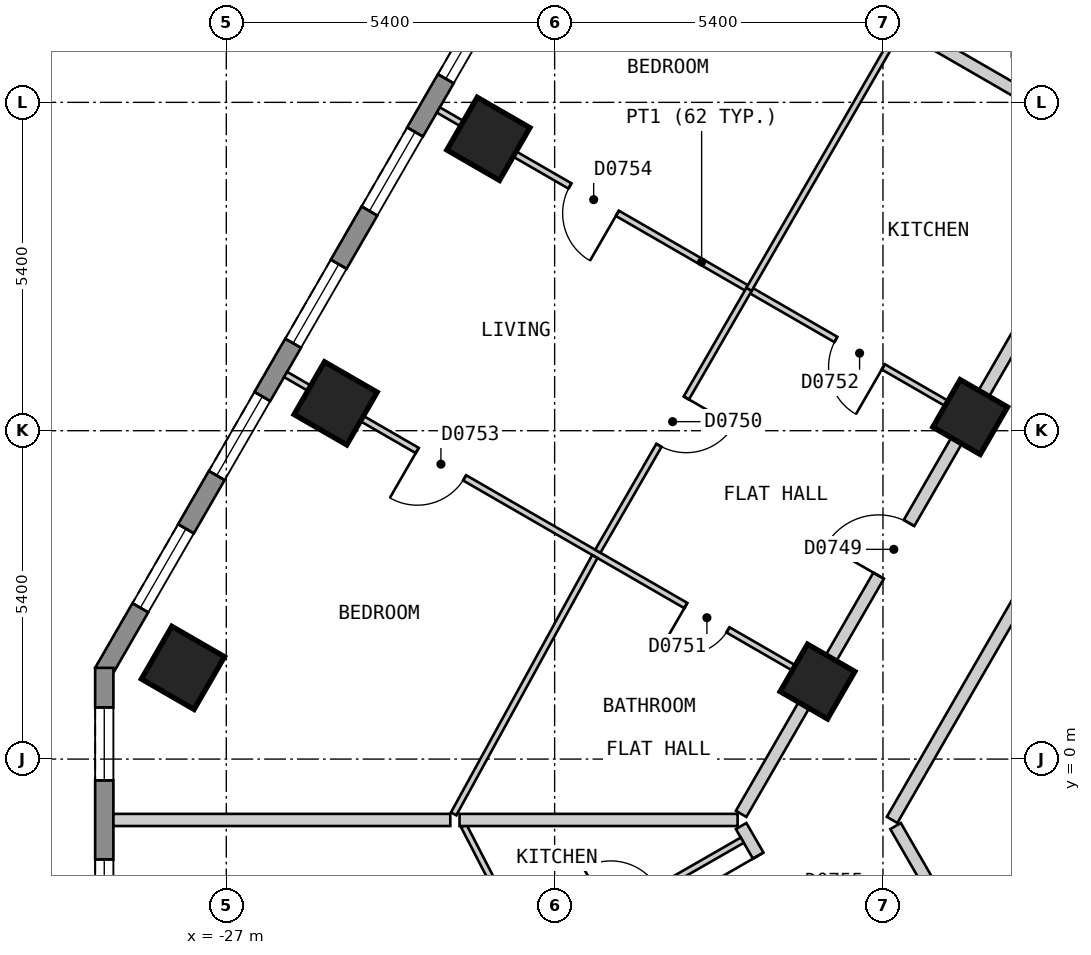
"""IFC4 building model, lengths in metres.
Left out: names, types, materials, properties, quantities, classifications, styles, units other than length and angle.
Written with IfcOpenShell. Run it as: python <this file> out.ifc"""

import sys

from ifc_helpers import new_model, si_unit, direction, frame, frame_2d, origin, origin_2d, place, context, subcontext, project, spatial, polyline, rectangle, outline, extrude, element, fill, save


model = new_model("IFC4")
c1 = context("Model", 3, precision=1e-05, world=origin(), true_north=direction((0.0, 1.0)))
c2 = subcontext(c1, "Body", "Model", "MODEL_VIEW")
j1 = project(units=[si_unit("LENGTHUNIT", "METRE"), si_unit("PLANEANGLEUNIT", "RADIAN")], contexts=[c1])
p1 = place(None, origin())
s1 = spatial("IfcSite", under=j1, at=p1, CompositionType="ELEMENT")
p2 = place(p1, origin())
s2 = spatial("IfcBuilding", under=s1, at=p2, CompositionType="ELEMENT")
p3 = place(p2, frame((0.0, 0.0, 93.0)))
s3 = spatial("IfcBuildingStorey", under=s2, at=p3, CompositionType="ELEMENT", Elevation=93.0)
for number, where, z_axis, x_axis in (
    (1, (-22.69, 10.2, 0.0), (0.0, 0.0, 1.0), (-0.5, -0.866, 0.0)),
    (2, (-25.202, 5.85, 0.0), (0.0, 0.0, 1.0), (-0.5, -0.866, 0.0)),
    (3, (-27.713, 1.5, 0.0), (0.0, 0.0, 1.0), (-0.5, -0.866, 0.0)),
):
    element("IfcColumn", number, at=place(p3, frame(where, z_axis=z_axis, x_axis=x_axis)), inside=s3, PredefinedType="COLUMN", context=c2, shape_type="SweptSolid", body=[
        extrude(rectangle(XDim=1.0, YDim=1.0, at=origin_2d()), origin(), (0.0, 0.0, 1.0), 3.0),
    ])
for number, where, z_axis, x_axis in (
    (4, (-14.766, 5.625, 0.0), (0.0, 0.0, 1.0), (-0.5, -0.866, 0.0)),
    (5, (-17.277, 1.275, 0.0), (0.0, 0.0, 1.0), (-0.5, -0.866, 0.0)),
):
    element("IfcColumn", number, at=place(p3, frame(where, z_axis=z_axis, x_axis=x_axis)), inside=s3, PredefinedType="COLUMN", context=c2, shape_type="SweptSolid", body=[
        extrude(rectangle(XDim=0.9, YDim=0.9, at=origin_2d()), origin(), (0.0, 0.0, 1.0), 3.0),
    ])
p4 = place(p3, frame((-15.747, 24.425, 0.0), z_axis=(0.0, 0.0, 1.0), x_axis=(-0.500027479704, -0.866009537788, 0.0)))
e6 = element("IfcWall", 6, at=p4, inside=s3, PredefinedType="SOLIDWALL", context=c2, shape_type="SweptSolid", body=[
    extrude(outline(polyline([(0.0, -0.15), (26.559, -0.15), (26.478, 0.15), (0.08, 0.15), (0.0, -0.15)])), origin(), (0.0, 0.0, 1.0), 2.7),
])
p5 = place(p4, frame((1.227, 0.0, 0.15)))
e7 = element("IfcOpeningElement", 7, at=p5, cuts=e6, PredefinedType="OPENING", context=c2, shape_type="SweptSolid", body=[
    extrude(rectangle(XDim=1.5, YDim=2.1, at=frame_2d((0.75, 1.05))), frame((0.0, 0.16, 0.0), z_axis=(0.0, -1.0, 0.0), x_axis=(1.0, 0.0, 0.0)), (0.0, 0.0, 1.0), 0.32),
])
p6 = place(p4, frame((3.739, 0.0, 0.15)))
e8 = element("IfcOpeningElement", 8, at=p6, cuts=e6, PredefinedType="OPENING", context=c2, shape_type="SweptSolid", body=[
    extrude(rectangle(XDim=1.5, YDim=2.1, at=frame_2d((0.75, 1.05))), frame((0.0, 0.16, 0.0), z_axis=(0.0, -1.0, 0.0), x_axis=(1.0, 0.0, 0.0)), (0.0, 0.0, 1.0), 0.32),
])
p7 = place(p4, frame((6.25, 0.0, 0.15)))
e9 = element("IfcOpeningElement", 9, at=p7, cuts=e6, PredefinedType="OPENING", context=c2, shape_type="SweptSolid", body=[
    extrude(rectangle(XDim=1.5, YDim=2.1, at=frame_2d((0.75, 1.05))), frame((0.0, 0.16, 0.0), z_axis=(0.0, -1.0, 0.0), x_axis=(1.0, 0.0, 0.0)), (0.0, 0.0, 1.0), 0.32),
])
p8 = place(p4, frame((8.761, 0.0, 0.15)))
e10 = element("IfcOpeningElement", 10, at=p8, cuts=e6, PredefinedType="OPENING", context=c2, shape_type="SweptSolid", body=[
    extrude(rectangle(XDim=1.5, YDim=2.1, at=frame_2d((0.75, 1.05))), frame((0.0, 0.16, 0.0), z_axis=(0.0, -1.0, 0.0), x_axis=(1.0, 0.0, 0.0)), (0.0, 0.0, 1.0), 0.32),
])
p9 = place(p4, frame((11.273, 0.0, 0.15)))
e11 = element("IfcOpeningElement", 11, at=p9, cuts=e6, PredefinedType="OPENING", context=c2, shape_type="SweptSolid", body=[
    extrude(rectangle(XDim=1.5, YDim=2.1, at=frame_2d((0.75, 1.05))), frame((0.0, 0.16, 0.0), z_axis=(0.0, -1.0, 0.0), x_axis=(1.0, 0.0, 0.0)), (0.0, 0.0, 1.0), 0.32),
])
p10 = place(p4, frame((13.785, 0.0, 0.15)))
e12 = element("IfcOpeningElement", 12, at=p10, cuts=e6, PredefinedType="OPENING", context=c2, shape_type="SweptSolid", body=[
    extrude(rectangle(XDim=1.5, YDim=2.1, at=frame_2d((0.75, 1.05))), frame((0.0, 0.16, 0.0), z_axis=(0.0, -1.0, 0.0), x_axis=(1.0, 0.0, 0.0)), (0.0, 0.0, 1.0), 0.32),
])
p11 = place(p4, frame((16.296, 0.0, 0.15)))
e13 = element("IfcOpeningElement", 13, at=p11, cuts=e6, PredefinedType="OPENING", context=c2, shape_type="SweptSolid", body=[
    extrude(rectangle(XDim=1.5, YDim=2.1, at=frame_2d((0.75, 1.05))), frame((0.0, 0.16, 0.0), z_axis=(0.0, -1.0, 0.0), x_axis=(1.0, 0.0, 0.0)), (0.0, 0.0, 1.0), 0.32),
])
p12 = place(p4, frame((18.807, 0.0, 0.15)))
e14 = element("IfcOpeningElement", 14, at=p12, cuts=e6, PredefinedType="OPENING", context=c2, shape_type="SweptSolid", body=[
    extrude(rectangle(XDim=1.5, YDim=2.1, at=frame_2d((0.75, 1.05))), frame((0.0, 0.16, 0.0), z_axis=(0.0, -1.0, 0.0), x_axis=(1.0, 0.0, 0.0)), (0.0, 0.0, 1.0), 0.32),
])
p13 = place(p4, frame((21.319, 0.0, 0.15)))
e15 = element("IfcOpeningElement", 15, at=p13, cuts=e6, PredefinedType="OPENING", context=c2, shape_type="SweptSolid", body=[
    extrude(rectangle(XDim=1.5, YDim=2.1, at=frame_2d((0.75, 1.05))), frame((0.0, 0.16, 0.0), z_axis=(0.0, -1.0, 0.0), x_axis=(1.0, 0.0, 0.0)), (0.0, 0.0, 1.0), 0.32),
])
p14 = place(p4, frame((23.831, 0.0, 0.15)))
e16 = element("IfcOpeningElement", 16, at=p14, cuts=e6, PredefinedType="OPENING", context=c2, shape_type="SweptSolid", body=[
    extrude(rectangle(XDim=1.5, YDim=2.1, at=frame_2d((0.75, 1.05))), frame((0.0, 0.16, 0.0), z_axis=(0.0, -1.0, 0.0), x_axis=(1.0, 0.0, 0.0)), (0.0, 0.0, 1.0), 0.32),
])
p15 = place(p3, frame((-29.007, 1.5, 0.0), z_axis=(0.0, 0.0, 1.0), x_axis=(0.0, -1.0, 0.0)))
e17 = element("IfcWall", 17, at=p15, inside=s3, PredefinedType="SOLIDWALL", context=c2, shape_type="SweptSolid", body=[
    extrude(outline(polyline([(0.0, -0.15), (5.0, -0.15), (4.92, 0.15), (0.08, 0.15), (0.0, -0.15)])), origin(), (0.0, 0.0, 1.0), 2.7),
])
p16 = place(p15, frame((0.65, 0.0, 0.15)))
e18 = element("IfcOpeningElement", 18, at=p16, cuts=e17, PredefinedType="OPENING", context=c2, shape_type="SweptSolid", body=[
    extrude(rectangle(XDim=1.2, YDim=2.1, at=frame_2d((0.6, 1.05))), frame((0.0, 0.16, 0.0), z_axis=(0.0, -1.0, 0.0), x_axis=(1.0, 0.0, 0.0)), (0.0, 0.0, 1.0), 0.32),
])
p17 = place(p15, frame((3.15, 0.0, 0.15)))
e19 = element("IfcOpeningElement", 19, at=p17, cuts=e17, PredefinedType="OPENING", context=c2, shape_type="SweptSolid", body=[
    extrude(rectangle(XDim=1.2, YDim=2.1, at=frame_2d((0.6, 1.05))), frame((0.0, 0.16, 0.0), z_axis=(0.0, -1.0, 0.0), x_axis=(1.0, 0.0, 0.0)), (0.0, 0.0, 1.0), 0.32),
])
p18 = place(p3, frame((-15.993, -1.101, 0.0), z_axis=(0.0, 0.0, 1.0), x_axis=(0.499894174133, -0.866086493757, 0.0)))
e20 = element("IfcWall", 20, at=p18, inside=s3, PredefinedType="PARTITIONING", context=c2, shape_type="SweptSolid", body=[
    extrude(rectangle(XDim=1.846, YDim=0.2, at=frame_2d((0.923, 0.0))), origin(), (0.0, 0.0, 1.0), 2.7),
])
p19 = place(p3, frame((-18.533, -1.101, 0.0), z_axis=(0.0, 0.0, 1.0), x_axis=(0.500135180047, -0.865947343479, 0.0)))
e21 = element("IfcWall", 21, at=p19, inside=s3, PredefinedType="PARTITIONING", context=c2, shape_type="SweptSolid", body=[
    extrude(rectangle(XDim=2.799, YDim=0.2, at=frame_2d((1.399, 0.0))), origin(), (0.0, 0.0, 1.0), 2.7),
])
p20 = place(p19, frame((0.562, 0.0, 0.0)))
e22 = element("IfcOpeningElement", 22, at=p20, cuts=e21, PredefinedType="OPENING", context=c2, shape_type="SweptSolid", body=[
    extrude(rectangle(XDim=1.0, YDim=2.1, at=frame_2d((0.5, 1.05))), frame((0.0, 0.11, 0.0), z_axis=(0.0, -1.0, 0.0), x_axis=(1.0, 0.0, 0.0)), (0.0, 0.0, 1.0), 0.22),
])
p21 = place(p3, frame((-16.05, -1.0, 0.0), z_axis=(0.0, 0.0, 1.0), x_axis=(0.499962449088, 0.866047082728, 0.0)))
e23 = element("IfcWall", 23, at=p21, inside=s3, PredefinedType="PARTITIONING", context=c2, shape_type="SweptSolid", body=[
    extrude(rectangle(XDim=10.391, YDim=0.2, at=frame_2d((5.195, 0.0))), origin(), (0.0, 0.0, 1.0), 2.7),
])
p22 = place(p21, frame((4.745, 0.0, 0.0)))
e24 = element("IfcOpeningElement", 24, at=p22, cuts=e23, PredefinedType="OPENING", context=c2, shape_type="SweptSolid", body=[
    extrude(rectangle(XDim=0.9, YDim=2.1, at=frame_2d((0.45, 1.05))), frame((0.0, 0.11, 0.0), z_axis=(0.0, -1.0, 0.0), x_axis=(1.0, 0.0, 0.0)), (0.0, 0.0, 1.0), 0.22),
])
p23 = place(p3, frame((-18.533, -0.901, 0.0), z_axis=(0.0, 0.0, 1.0), x_axis=(0.499981198768, 0.866036258409, 0.0)))
e25 = element("IfcWall", 25, at=p23, inside=s3, PredefinedType="PARTITIONING", context=c2, shape_type="SweptSolid", body=[
    extrude(rectangle(XDim=20.093, YDim=0.2, at=frame_2d((10.046, 0.0))), origin(), (0.0, 0.0, 1.0), 2.7),
])
p24 = place(p23, frame((14.57, 0.0, 0.0)))
e26 = element("IfcOpeningElement", 26, at=p24, cuts=e25, PredefinedType="OPENING", context=c2, shape_type="SweptSolid", body=[
    extrude(rectangle(XDim=1.0, YDim=2.1, at=frame_2d((0.5, 1.05))), frame((0.0, 0.11, 0.0), z_axis=(0.0, -1.0, 0.0), x_axis=(1.0, 0.0, 0.0)), (0.0, 0.0, 1.0), 0.22),
])
p25 = place(p23, frame((4.523, 0.0, 0.0)))
e27 = element("IfcOpeningElement", 27, at=p25, cuts=e25, PredefinedType="OPENING", context=c2, shape_type="SweptSolid", body=[
    extrude(rectangle(XDim=1.0, YDim=2.1, at=frame_2d((0.5, 1.05))), frame((0.0, 0.11, 0.0), z_axis=(0.0, -1.0, 0.0), x_axis=(1.0, 0.0, 0.0)), (0.0, 0.0, 1.0), 0.22),
])
p26 = place(p3, frame((-23.093, -1.101, 0.0), z_axis=(0.0, 0.0, 1.0), x_axis=(0.459171814268, -0.888347479865, 0.0)))
e28 = element("IfcWall", 28, at=p26, inside=s3, PredefinedType="PARTITIONING", context=c2, shape_type="SweptSolid", body=[
    extrude(rectangle(XDim=2.01, YDim=0.1, at=frame_2d((1.005, 0.0))), origin(), (0.0, 0.0, 1.0), 2.7),
])
p27 = place(p3, frame((-26.025, 6.325, 0.0), z_axis=(0.0, 0.0, 1.0), x_axis=(0.866041268327, -0.499972520799, 0.0)))
e29 = element("IfcWall", 29, at=p27, inside=s3, PredefinedType="PARTITIONING", context=c2, shape_type="SweptSolid", body=[
    extrude(rectangle(XDim=10.0, YDim=0.1, at=frame_2d((5.0, 0.0))), origin(), (0.0, 0.0, 1.0), 2.7),
])
p28 = place(p27, frame((7.601, 0.0, 0.0)))
e30 = element("IfcOpeningElement", 30, at=p28, cuts=e29, PredefinedType="OPENING", context=c2, shape_type="SweptSolid", body=[
    extrude(rectangle(XDim=0.8, YDim=2.1, at=frame_2d((0.4, 1.05))), frame((0.0, 0.06, 0.0), z_axis=(0.0, -1.0, 0.0), x_axis=(1.0, 0.0, 0.0)), (0.0, 0.0, 1.0), 0.12),
])
p29 = place(p27, frame((2.5, 0.0, 0.0)))
e31 = element("IfcOpeningElement", 31, at=p29, cuts=e29, PredefinedType="OPENING", context=c2, shape_type="SweptSolid", body=[
    extrude(rectangle(XDim=0.9, YDim=2.1, at=frame_2d((0.45, 1.05))), frame((0.0, 0.06, 0.0), z_axis=(0.0, -1.0, 0.0), x_axis=(1.0, 0.0, 0.0)), (0.0, 0.0, 1.0), 0.12),
])
p30 = place(p3, frame((-23.513, 10.675, 0.0), z_axis=(0.0, 0.0, 1.0), x_axis=(0.866041268327, -0.499972520799, 0.0)))
e32 = element("IfcWall", 32, at=p30, inside=s3, PredefinedType="PARTITIONING", context=c2, shape_type="SweptSolid", body=[
    extrude(rectangle(XDim=10.0, YDim=0.1, at=frame_2d((5.0, 0.0))), origin(), (0.0, 0.0, 1.0), 2.7),
])
p31 = place(p30, frame((7.55, 0.0, 0.0)))
e33 = element("IfcOpeningElement", 33, at=p31, cuts=e32, PredefinedType="OPENING", context=c2, shape_type="SweptSolid", body=[
    extrude(rectangle(XDim=0.9, YDim=2.1, at=frame_2d((0.45, 1.05))), frame((0.0, 0.06, 0.0), z_axis=(0.0, -1.0, 0.0), x_axis=(1.0, 0.0, 0.0)), (0.0, 0.0, 1.0), 0.12),
])
p32 = place(p30, frame((2.5, 0.0, 0.0)))
e34 = element("IfcOpeningElement", 34, at=p32, cuts=e32, PredefinedType="OPENING", context=c2, shape_type="SweptSolid", body=[
    extrude(rectangle(XDim=0.9, YDim=2.1, at=frame_2d((0.45, 1.05))), frame((0.0, 0.06, 0.0), z_axis=(0.0, -1.0, 0.0), x_axis=(1.0, 0.0, 0.0)), (0.0, 0.0, 1.0), 0.12),
])
p33 = place(p3, frame((-15.009, 13.196, 0.0), z_axis=(0.0, 0.0, 1.0), x_axis=(0.865916335424, -0.500188864377, 0.0)))
e35 = element("IfcWall", 35, at=p33, inside=s3, PredefinedType="PARTITIONING", context=c2, shape_type="SweptSolid", body=[
    extrude(rectangle(XDim=3.896, YDim=0.1, at=frame_2d((1.948, 0.0))), origin(), (0.0, 0.0, 1.0), 2.7),
])
p34 = place(p33, frame((1.573, 0.0, 0.0)))
e36 = element("IfcOpeningElement", 36, at=p34, cuts=e35, PredefinedType="OPENING", context=c2, shape_type="SweptSolid", body=[
    extrude(rectangle(XDim=0.8, YDim=2.1, at=frame_2d((0.4, 1.05))), frame((0.0, 0.06, 0.0), z_axis=(0.0, -1.0, 0.0), x_axis=(1.0, 0.0, 0.0)), (0.0, 0.0, 1.0), 0.12),
])
p35 = place(p3, frame((-20.89, 3.418, 0.0), z_axis=(0.0, 0.0, 1.0), x_axis=(0.500014231302, 0.866017187182, 0.0)))
e37 = element("IfcWall", 37, at=p35, inside=s3, PredefinedType="PARTITIONING", context=c2, shape_type="SweptSolid", body=[
    extrude(rectangle(XDim=4.973, YDim=0.1, at=frame_2d((2.487, 0.0))), origin(), (0.0, 0.0, 1.0), 2.7),
])
p36 = place(p35, frame((2.011, 0.0, 0.0)))
e38 = element("IfcOpeningElement", 38, at=p36, cuts=e37, PredefinedType="OPENING", context=c2, shape_type="SweptSolid", body=[
    extrude(rectangle(XDim=0.9, YDim=2.1, at=frame_2d((0.45, 1.05))), frame((0.0, 0.06, 0.0), z_axis=(0.0, -1.0, 0.0), x_axis=(1.0, 0.0, 0.0)), (0.0, 0.0, 1.0), 0.12),
])
p37 = place(p3, frame((-23.261, -0.901, 0.0), z_axis=(0.0, 0.0, 1.0), x_axis=(0.481037050261, 0.876700265927, 0.0)))
e39 = element("IfcWall", 39, at=p37, inside=s3, PredefinedType="PARTITIONING", context=c2, shape_type="SweptSolid", body=[
    extrude(rectangle(XDim=4.827, YDim=0.1, at=frame_2d((2.414, 0.0))), origin(), (0.0, 0.0, 1.0), 2.7),
])
p38 = place(p3, frame((-22.094, -3.388, 0.0), z_axis=(0.0, 0.0, 1.0), x_axis=(0.867386440944, 0.497635169644, 0.0)))
e40 = element("IfcWall", 40, at=p38, inside=s3, PredefinedType="PARTITIONING", context=c2, shape_type="SweptSolid", body=[
    extrude(rectangle(XDim=4.127, YDim=0.1, at=frame_2d((2.064, 0.0))), origin(), (0.0, 0.0, 1.0), 2.7),
])
p39 = place(p38, frame((1.634, 0.0, 0.0)))
e41 = element("IfcOpeningElement", 41, at=p39, cuts=e40, PredefinedType="OPENING", context=c2, shape_type="SweptSolid", body=[
    extrude(rectangle(XDim=0.9, YDim=2.1, at=frame_2d((0.45, 1.05))), frame((0.0, 0.06, 0.0), z_axis=(0.0, -1.0, 0.0), x_axis=(1.0, 0.0, 0.0)), (0.0, 0.0, 1.0), 0.12),
])
p40 = place(p3, frame((-15.758, 11.998, 0.0), z_axis=(0.0, 0.0, 1.0), x_axis=(0.865987741337, -0.5000652276, 0.0)))
e42 = element("IfcWall", 42, at=p40, inside=s3, PredefinedType="PARTITIONING", context=c2, shape_type="SweptSolid", body=[
    extrude(rectangle(XDim=3.946, YDim=0.2, at=frame_2d((1.973, 0.0))), origin(), (0.0, 0.0, 1.0), 2.7),
])
p41 = place(p3, frame((-28.857, -1.001, 0.0), z_axis=(0.0, 0.0, 1.0), x_axis=(1.0, 0.0, 0.0)))
e43 = element("IfcWall", 43, at=p41, inside=s3, PredefinedType="PARTITIONING", context=c2, shape_type="SweptSolid", body=[
    extrude(rectangle(XDim=5.541, YDim=0.2, at=frame_2d((2.771, 0.0))), origin(), (0.0, 0.0, 1.0), 2.7),
])
p42 = place(p3, frame((-23.164, -1.001, 0.0), z_axis=(0.0, 0.0, 1.0), x_axis=(1.0, 0.0, 0.0)))
e44 = element("IfcWall", 44, at=p42, inside=s3, PredefinedType="PARTITIONING", context=c2, shape_type="SweptSolid", body=[
    extrude(rectangle(XDim=4.573, YDim=0.2, at=frame_2d((2.287, 0.0))), origin(), (0.0, 0.0, 1.0), 2.7),
])
p43 = place(p3, frame((-18.403, 7.725, 0.0), z_axis=(0.0, 0.0, 1.0), x_axis=(0.499995794706, 0.866027831699, 0.0)))
e45 = element("IfcWall", 45, at=p43, inside=s3, PredefinedType="PARTITIONING", context=c2, shape_type="SweptSolid", body=[
    extrude(rectangle(XDim=4.922, YDim=0.1, at=frame_2d((2.461, 0.0))), origin(), (0.0, 0.0, 1.0), 2.7),
])
p44 = place(p10, origin())
e46 = element("IfcWindow", 46, at=p44, inside=s3, PartitioningType="SINGLE_PANEL", PredefinedType="WINDOW", context=c2, shape_type="SweptSolid", body=[
    extrude(rectangle(XDim=1.5, YDim=2.1, at=frame_2d((0.75, 1.05))), frame((0.0, 0.03, 0.0), z_axis=(0.0, -1.0, 0.0), x_axis=(1.0, 0.0, 0.0)), (0.0, 0.0, 1.0), 0.06),
])
fill(e12, e46)
p45 = place(p11, origin())
e47 = element("IfcWindow", 47, at=p45, inside=s3, PartitioningType="SINGLE_PANEL", PredefinedType="WINDOW", context=c2, shape_type="SweptSolid", body=[
    extrude(rectangle(XDim=1.5, YDim=2.1, at=frame_2d((0.75, 1.05))), frame((0.0, 0.03, 0.0), z_axis=(0.0, -1.0, 0.0), x_axis=(1.0, 0.0, 0.0)), (0.0, 0.0, 1.0), 0.06),
])
fill(e13, e47)
p46 = place(p12, origin())
e48 = element("IfcWindow", 48, at=p46, inside=s3, PartitioningType="SINGLE_PANEL", PredefinedType="WINDOW", context=c2, shape_type="SweptSolid", body=[
    extrude(rectangle(XDim=1.5, YDim=2.1, at=frame_2d((0.75, 1.05))), frame((0.0, 0.03, 0.0), z_axis=(0.0, -1.0, 0.0), x_axis=(1.0, 0.0, 0.0)), (0.0, 0.0, 1.0), 0.06),
])
fill(e14, e48)
p47 = place(p13, origin())
e49 = element("IfcWindow", 49, at=p47, inside=s3, PartitioningType="SINGLE_PANEL", PredefinedType="WINDOW", context=c2, shape_type="SweptSolid", body=[
    extrude(rectangle(XDim=1.5, YDim=2.1, at=frame_2d((0.75, 1.05))), frame((0.0, 0.03, 0.0), z_axis=(0.0, -1.0, 0.0), x_axis=(1.0, 0.0, 0.0)), (0.0, 0.0, 1.0), 0.06),
])
fill(e15, e49)
p48 = place(p14, origin())
e50 = element("IfcWindow", 50, at=p48, inside=s3, PartitioningType="SINGLE_PANEL", PredefinedType="WINDOW", context=c2, shape_type="SweptSolid", body=[
    extrude(rectangle(XDim=1.5, YDim=2.1, at=frame_2d((0.75, 1.05))), frame((0.0, 0.03, 0.0), z_axis=(0.0, -1.0, 0.0), x_axis=(1.0, 0.0, 0.0)), (0.0, 0.0, 1.0), 0.06),
])
fill(e16, e50)
p49 = place(p16, origin())
e51 = element("IfcWindow", 51, at=p49, inside=s3, PartitioningType="SINGLE_PANEL", PredefinedType="WINDOW", context=c2, shape_type="SweptSolid", body=[
    extrude(rectangle(XDim=1.2, YDim=2.1, at=frame_2d((0.6, 1.05))), frame((0.0, 0.03, 0.0), z_axis=(0.0, -1.0, 0.0), x_axis=(1.0, 0.0, 0.0)), (0.0, 0.0, 1.0), 0.06),
])
fill(e18, e51)
p50 = place(p17, origin())
e52 = element("IfcWindow", 52, at=p50, inside=s3, PartitioningType="SINGLE_PANEL", PredefinedType="WINDOW", context=c2, shape_type="SweptSolid", body=[
    extrude(rectangle(XDim=1.2, YDim=2.1, at=frame_2d((0.6, 1.05))), frame((0.0, 0.03, 0.0), z_axis=(0.0, -1.0, 0.0), x_axis=(1.0, 0.0, 0.0)), (0.0, 0.0, 1.0), 0.06),
])
fill(e19, e52)
p51 = place(p25, origin())
e53 = element("IfcDoor", 53, at=p51, inside=s3, OperationType="SINGLE_SWING_LEFT", PredefinedType="DOOR", context=c2, shape_type="SweptSolid", body=[
    extrude(rectangle(XDim=1.0, YDim=2.1, at=frame_2d((0.5, 1.05))), frame((0.0, 0.025, 0.0), z_axis=(0.0, -1.0, 0.0), x_axis=(1.0, 0.0, 0.0)), (0.0, 0.0, 1.0), 0.05),
])
fill(e27, e53)
p52 = place(p36, origin())
e54 = element("IfcDoor", 54, at=p52, inside=s3, OperationType="SINGLE_SWING_RIGHT", PredefinedType="DOOR", context=c2, shape_type="SweptSolid", body=[
    extrude(rectangle(XDim=0.9, YDim=2.1, at=frame_2d((0.45, 1.05))), frame((0.0, 0.025, 0.0), z_axis=(0.0, -1.0, 0.0), x_axis=(1.0, 0.0, 0.0)), (0.0, 0.0, 1.0), 0.05),
])
fill(e38, e54)
p53 = place(p28, origin())
e55 = element("IfcDoor", 55, at=p53, inside=s3, OperationType="SINGLE_SWING_LEFT", PredefinedType="DOOR", context=c2, shape_type="SweptSolid", body=[
    extrude(rectangle(XDim=0.8, YDim=2.1, at=frame_2d((0.4, 1.05))), frame((0.0, 0.025, 0.0), z_axis=(0.0, -1.0, 0.0), x_axis=(1.0, 0.0, 0.0)), (0.0, 0.0, 1.0), 0.05),
])
fill(e30, e55)
p54 = place(p31, origin())
e56 = element("IfcDoor", 56, at=p54, inside=s3, OperationType="SINGLE_SWING_RIGHT", PredefinedType="DOOR", context=c2, shape_type="SweptSolid", body=[
    extrude(rectangle(XDim=0.9, YDim=2.1, at=frame_2d((0.45, 1.05))), frame((0.0, 0.025, 0.0), z_axis=(0.0, -1.0, 0.0), x_axis=(1.0, 0.0, 0.0)), (0.0, 0.0, 1.0), 0.05),
])
fill(e33, e56)
p55 = place(p29, origin())
e57 = element("IfcDoor", 57, at=p55, inside=s3, OperationType="SINGLE_SWING_LEFT", PredefinedType="DOOR", context=c2, shape_type="SweptSolid", body=[
    extrude(rectangle(XDim=0.9, YDim=2.1, at=frame_2d((0.45, 1.05))), frame((0.0, 0.025, 0.0), z_axis=(0.0, -1.0, 0.0), x_axis=(1.0, 0.0, 0.0)), (0.0, 0.0, 1.0), 0.05),
])
fill(e31, e57)
p56 = place(p32, origin())
e58 = element("IfcDoor", 58, at=p56, inside=s3, OperationType="SINGLE_SWING_RIGHT", PredefinedType="DOOR", context=c2, shape_type="SweptSolid", body=[
    extrude(rectangle(XDim=0.9, YDim=2.1, at=frame_2d((0.45, 1.05))), frame((0.0, 0.025, 0.0), z_axis=(0.0, -1.0, 0.0), x_axis=(1.0, 0.0, 0.0)), (0.0, 0.0, 1.0), 0.05),
])
fill(e34, e58)
p57 = place(p20, origin())
e59 = element("IfcDoor", 59, at=p57, inside=s3, OperationType="SINGLE_SWING_LEFT", PredefinedType="DOOR", context=c2, shape_type="SweptSolid", body=[
    extrude(rectangle(XDim=1.0, YDim=2.1, at=frame_2d((0.5, 1.05))), frame((0.0, 0.025, 0.0), z_axis=(0.0, -1.0, 0.0), x_axis=(1.0, 0.0, 0.0)), (0.0, 0.0, 1.0), 0.05),
])
fill(e22, e59)
save(model, sys.argv[1])
